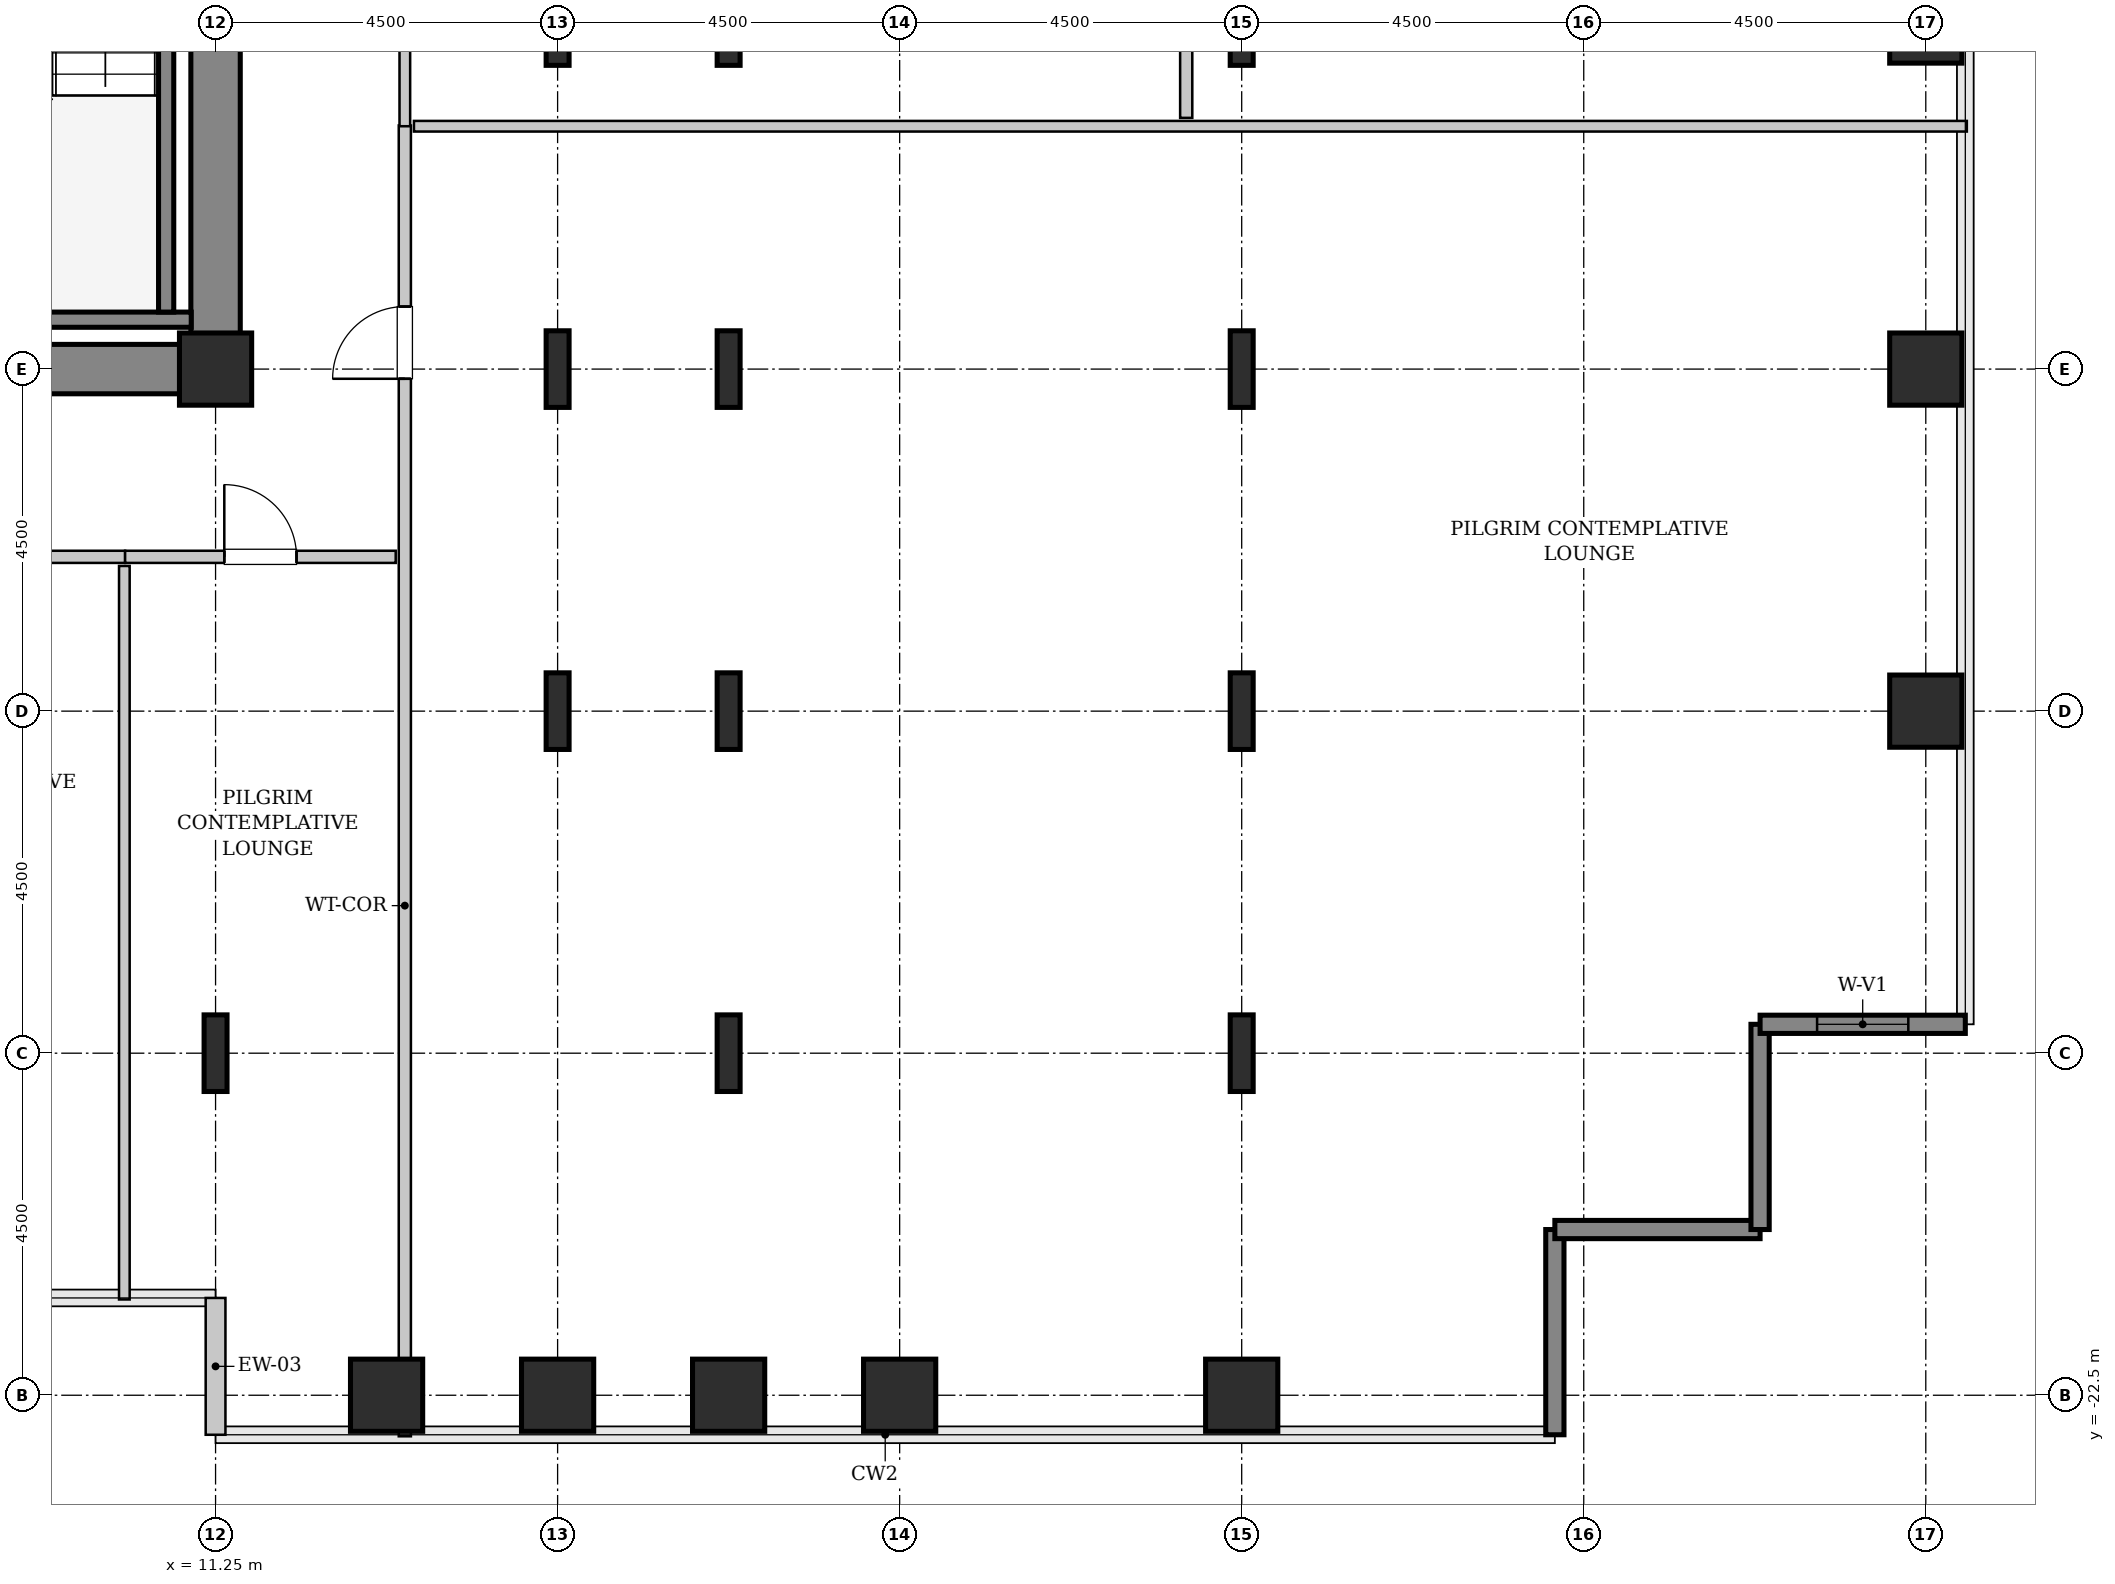
"""IFC4 building model, lengths in metres.
Left out: names, types, materials, properties, quantities, classifications, styles, units other than length and angle.
Written with IfcOpenShell. Run it as: python <this file> out.ifc"""

import sys

from ifc_helpers import new_model, si_unit, direction, frame, frame_2d, origin, origin_2d, place, context, subcontext, project, spatial, rectangle, hollow_rectangle, i_section, extrude, source, transform, mapped, element, fill, save


model = new_model("IFC4")
c1 = context("Model", 3, precision=1e-05, world=origin(), true_north=direction((0.0, 1.0)))
c2 = subcontext(c1, "Body", "Model", "MODEL_VIEW")
j1 = project(units=[si_unit("LENGTHUNIT", "METRE"), si_unit("PLANEANGLEUNIT", "RADIAN")], contexts=[c1])
p1 = place(None, origin())
s1 = spatial("IfcSite", under=j1, at=p1, CompositionType="ELEMENT")
p2 = place(p1, origin())
s2 = spatial("IfcBuilding", under=s1, at=p2, CompositionType="ELEMENT")
p3 = place(p2, frame((0.0, 0.0, 74.8)))
s3 = spatial("IfcBuildingStorey", under=s2, at=p3, CompositionType="ELEMENT", Elevation=74.8)
m1 = source(origin(), c2, "Body", "SweptSolid", [
    extrude(rectangle(XDim=10.025, YDim=0.65, at=frame_2d((5.012, 0.0))), origin(), (0.0, 0.0, 1.0), 3.8),
])
p4 = place(p3, frame((1.55, -9.0, 0.0), z_axis=(0.0, 0.0, 1.0), x_axis=(1.0, 0.0, 0.0)))
e1 = element("IfcWall", 1, at=p4, inside=s3, PredefinedType="SHEAR", context=c2, shape_type="MappedRepresentation", body=[
    mapped(m1, transform((0.0, 0.0, 0.0), x_axis=(1.0, 0.0, 0.0), y_axis=(0.0, 1.0, 0.0), z_axis=(0.0, 0.0, 1.0), scale=1.0)),
])
m2 = source(origin(), c2, "Body", "SweptSolid", [
    extrude(rectangle(XDim=7.325, YDim=0.65, at=frame_2d((3.663, 0.0))), origin(), (0.0, 0.0, 1.0), 3.8),
])
p5 = place(p3, frame((11.25, -8.675, 0.0), z_axis=(0.0, 0.0, 1.0), x_axis=(0.0, 1.0, 0.0)))
e2 = element("IfcWall", 2, at=p5, inside=s3, PredefinedType="SHEAR", context=c2, shape_type="MappedRepresentation", body=[
    mapped(m2, transform((0.0, 0.0, 0.0), x_axis=(1.0, 0.0, 0.0), y_axis=(0.0, 1.0, 0.0), z_axis=(0.0, 0.0, 1.0), scale=1.0)),
])
m3 = source(origin(), c2, "Body", "SweptSolid", [
    extrude(i_section(OverallWidth=0.302, OverallDepth=1.008, WebThickness=0.021, FlangeThickness=0.04, FilletRadius=0.03, at=origin_2d()), origin(), (0.0, 0.0, 1.0), 3.8),
])
p6 = place(p3, frame((11.25, -18.0, 0.0), z_axis=(0.0, 0.0, 1.0), x_axis=(1.0, 0.0, 0.0)))
e3 = element("IfcColumn", 3, at=p6, inside=s3, PredefinedType="COLUMN", context=c2, shape_type="MappedRepresentation", body=[
    mapped(m3, transform((0.0, 0.0, 0.0), x_axis=(1.0, 0.0, 0.0), y_axis=(0.0, 1.0, 0.0), z_axis=(0.0, 0.0, 1.0), scale=1.0)),
])
m4 = source(origin(), c2, "Body", "SweptSolid", [
    extrude(hollow_rectangle(XDim=0.95, YDim=0.95, WallThickness=0.045, InnerFilletRadius=0.045, OuterFilletRadius=0.09, at=origin_2d()), origin(), (0.0, 0.0, 1.0), 3.8),
])
p7 = place(p3, frame((11.25, -9.0, 0.0), z_axis=(0.0, 0.0, 1.0), x_axis=(1.0, 0.0, 0.0)))
e4 = element("IfcColumn", 4, at=p7, inside=s3, PredefinedType="COLUMN", context=c2, shape_type="MappedRepresentation", body=[
    mapped(m4, transform((0.0, 0.0, 0.0), x_axis=(1.0, 0.0, 0.0), y_axis=(0.0, 1.0, 0.0), z_axis=(0.0, 0.0, 1.0), scale=1.0)),
])
m5 = source(origin(), c2, "Body", "SweptSolid", [
    extrude(hollow_rectangle(XDim=0.95, YDim=0.95, WallThickness=0.045, InnerFilletRadius=0.045, OuterFilletRadius=0.09, at=origin_2d()), origin(), (0.0, 0.0, 1.0), 3.8),
])
for number, where, z_axis, x_axis in (
    (5, (13.5, -22.5, 0.0), (0.0, 0.0, 1.0), (1.0, 0.0, 0.0)),
    (6, (15.75, -22.5, 0.0), (0.0, 0.0, 1.0), (1.0, 0.0, 0.0)),
):
    element("IfcColumn", number, at=place(p3, frame(where, z_axis=z_axis, x_axis=x_axis)), inside=s3, PredefinedType="COLUMN", context=c2, shape_type="MappedRepresentation", body=[
        mapped(m5, transform((0.0, 0.0, 0.0), x_axis=(1.0, 0.0, 0.0), y_axis=(0.0, 1.0, 0.0), z_axis=(0.0, 0.0, 1.0), scale=1.0)),
    ])
for number, where, z_axis, x_axis in (
    (7, (15.75, -13.5, 0.0), (0.0, 0.0, 1.0), (1.0, 0.0, 0.0)),
    (8, (15.75, -9.0, 0.0), (0.0, 0.0, 1.0), (1.0, 0.0, 0.0)),
    (9, (15.75, -4.5, 0.0), (0.0, 0.0, 1.0), (1.0, 0.0, 0.0)),
):
    element("IfcColumn", number, at=place(p3, frame(where, z_axis=z_axis, x_axis=x_axis)), inside=s3, PredefinedType="COLUMN", context=c2, shape_type="MappedRepresentation", body=[
        mapped(m3, transform((0.0, 0.0, 0.0), x_axis=(1.0, 0.0, 0.0), y_axis=(0.0, 1.0, 0.0), z_axis=(0.0, 0.0, 1.0), scale=1.0)),
    ])
p8 = place(p3, frame((18.0, -22.5, 0.0), z_axis=(0.0, 0.0, 1.0), x_axis=(1.0, 0.0, 0.0)))
e10 = element("IfcColumn", 10, at=p8, inside=s3, PredefinedType="COLUMN", context=c2, shape_type="MappedRepresentation", body=[
    mapped(m5, transform((0.0, 0.0, 0.0), x_axis=(1.0, 0.0, 0.0), y_axis=(0.0, 1.0, 0.0), z_axis=(0.0, 0.0, 1.0), scale=1.0)),
])
for number, where, z_axis, x_axis in (
    (11, (18.0, -18.0, 0.0), (0.0, 0.0, 1.0), (1.0, 0.0, 0.0)),
    (12, (18.0, -13.5, 0.0), (0.0, 0.0, 1.0), (1.0, 0.0, 0.0)),
    (13, (18.0, -9.0, 0.0), (0.0, 0.0, 1.0), (1.0, 0.0, 0.0)),
    (14, (18.0, -4.5, 0.0), (0.0, 0.0, 1.0), (1.0, 0.0, 0.0)),
):
    element("IfcColumn", number, at=place(p3, frame(where, z_axis=z_axis, x_axis=x_axis)), inside=s3, PredefinedType="COLUMN", context=c2, shape_type="MappedRepresentation", body=[
        mapped(m3, transform((0.0, 0.0, 0.0), x_axis=(1.0, 0.0, 0.0), y_axis=(0.0, 1.0, 0.0), z_axis=(0.0, 0.0, 1.0), scale=1.0)),
    ])
for number, where, z_axis, x_axis in (
    (15, (20.25, -22.5, 0.0), (0.0, 0.0, 1.0), (1.0, 0.0, 0.0)),
    (16, (24.75, -22.5, 0.0), (0.0, 0.0, 1.0), (1.0, 0.0, 0.0)),
):
    element("IfcColumn", number, at=place(p3, frame(where, z_axis=z_axis, x_axis=x_axis)), inside=s3, PredefinedType="COLUMN", context=c2, shape_type="MappedRepresentation", body=[
        mapped(m5, transform((0.0, 0.0, 0.0), x_axis=(1.0, 0.0, 0.0), y_axis=(0.0, 1.0, 0.0), z_axis=(0.0, 0.0, 1.0), scale=1.0)),
    ])
for number, where, z_axis, x_axis in (
    (17, (24.75, -18.0, 0.0), (0.0, 0.0, 1.0), (1.0, 0.0, 0.0)),
    (18, (24.75, -13.5, 0.0), (0.0, 0.0, 1.0), (1.0, 0.0, 0.0)),
    (19, (24.75, -9.0, 0.0), (0.0, 0.0, 1.0), (1.0, 0.0, 0.0)),
    (20, (24.75, -4.5, 0.0), (0.0, 0.0, 1.0), (1.0, 0.0, 0.0)),
):
    element("IfcColumn", number, at=place(p3, frame(where, z_axis=z_axis, x_axis=x_axis)), inside=s3, PredefinedType="COLUMN", context=c2, shape_type="MappedRepresentation", body=[
        mapped(m3, transform((0.0, 0.0, 0.0), x_axis=(1.0, 0.0, 0.0), y_axis=(0.0, 1.0, 0.0), z_axis=(0.0, 0.0, 1.0), scale=1.0)),
    ])
for number, where, z_axis, x_axis in (
    (21, (33.75, -13.5, 0.0), (0.0, 0.0, 1.0), (1.0, 0.0, 0.0)),
    (22, (33.75, -9.0, 0.0), (0.0, 0.0, 1.0), (1.0, 0.0, 0.0)),
    (23, (33.75, -4.5, 0.0), (0.0, 0.0, 1.0), (1.0, 0.0, 0.0)),
):
    element("IfcColumn", number, at=place(p3, frame(where, z_axis=z_axis, x_axis=x_axis)), inside=s3, PredefinedType="COLUMN", context=c2, shape_type="MappedRepresentation", body=[
        mapped(m5, transform((0.0, 0.0, 0.0), x_axis=(1.0, 0.0, 0.0), y_axis=(0.0, 1.0, 0.0), z_axis=(0.0, 0.0, 1.0), scale=1.0)),
    ])
m6 = source(origin(), c2, "Body", "SweptSolid", [
    extrude(rectangle(XDim=1.8, YDim=0.26, at=frame_2d((0.9, 0.0))), origin(), (0.0, 0.0, 1.0), 3.55),
])
p9 = place(p3, frame((11.25, -21.22, 0.0), z_axis=(0.0, 0.0, 1.0), x_axis=(0.0, -1.0, 0.0)))
e24 = element("IfcWall", 24, at=p9, inside=s3, PredefinedType="SOLIDWALL", context=c2, shape_type="MappedRepresentation", body=[
    mapped(m6, transform((0.0, 0.0, 0.0), x_axis=(1.0, 0.0, 0.0), y_axis=(0.0, 1.0, 0.0), z_axis=(0.0, 0.0, 1.0), scale=1.0)),
])
m7 = source(origin(), c2, "Body", "SweptSolid", [
    extrude(rectangle(XDim=2.7, YDim=0.24, at=frame_2d((1.35, 0.0))), origin(), (0.0, 0.0, 1.0), 3.55),
])
for number, where, z_axis, x_axis in (
    (25, (28.87, -23.02, 0.0), (0.0, 0.0, 1.0), (0.0, 1.0, 0.0)),
    (26, (28.87, -20.32, 0.0), (0.0, 0.0, 1.0), (1.0, 0.0, 0.0)),
    (27, (31.57, -20.32, 0.0), (0.0, 0.0, 1.0), (0.0, 1.0, 0.0)),
):
    element("IfcWall", number, at=place(p3, frame(where, z_axis=z_axis, x_axis=x_axis)), inside=s3, PredefinedType="SHEAR", context=c2, shape_type="MappedRepresentation", body=[
        mapped(m7, transform((0.0, 0.0, 0.0), x_axis=(1.0, 0.0, 0.0), y_axis=(0.0, 1.0, 0.0), z_axis=(0.0, 0.0, 1.0), scale=1.0)),
    ])
p10 = place(p3, frame((31.57, -17.62, 0.0), z_axis=(0.0, 0.0, 1.0), x_axis=(1.0, 0.0, 0.0)))
e28 = element("IfcWall", 28, at=p10, inside=s3, PredefinedType="SHEAR", context=c2, shape_type="MappedRepresentation", body=[
    mapped(m7, transform((0.0, 0.0, 0.0), x_axis=(1.0, 0.0, 0.0), y_axis=(0.0, 1.0, 0.0), z_axis=(0.0, 0.0, 1.0), scale=1.0)),
])
p11 = place(p10, frame((0.75, 0.0, 0.85)))
e29 = element("IfcOpeningElement", 29, at=p11, cuts=e28, PredefinedType="OPENING", context=c2, shape_type="SweptSolid", body=[
    extrude(rectangle(XDim=1.2, YDim=1.8, at=frame_2d((0.6, 0.9))), frame((0.0, 0.13, 0.0), z_axis=(0.0, -1.0, 0.0), x_axis=(1.0, 0.0, 0.0)), (0.0, 0.0, 1.0), 0.26),
])
m8 = source(origin(), c2, "Body", "SweptSolid", [
    extrude(rectangle(XDim=3.63, YDim=0.2, at=frame_2d((1.815, 0.0))), origin(), (0.0, 0.0, 1.0), 3.8),
])
p12 = place(p3, frame((7.3, -8.35, 0.0), z_axis=(0.0, 0.0, 1.0), x_axis=(1.0, 0.0, 0.0)))
e30 = element("IfcWall", 30, at=p12, inside=s3, PredefinedType="SOLIDWALL", context=c2, shape_type="MappedRepresentation", body=[
    mapped(m8, transform((0.0, 0.0, 0.0), x_axis=(1.0, 0.0, 0.0), y_axis=(0.0, 1.0, 0.0), z_axis=(0.0, 0.0, 1.0), scale=1.0)),
])
m9 = source(origin(), c2, "Body", "SweptSolid", [
    extrude(rectangle(XDim=7.1, YDim=0.2, at=frame_2d((3.55, 0.0))), origin(), (0.0, 0.0, 1.0), 3.8),
])
p13 = place(p3, frame((10.6, -1.15, 0.0), z_axis=(0.0, 0.0, 1.0), x_axis=(0.0, -1.0, 0.0)))
e31 = element("IfcWall", 31, at=p13, inside=s3, PredefinedType="SOLIDWALL", context=c2, shape_type="MappedRepresentation", body=[
    mapped(m9, transform((0.0, 0.0, 0.0), x_axis=(1.0, 0.0, 0.0), y_axis=(0.0, 1.0, 0.0), z_axis=(0.0, 0.0, 1.0), scale=1.0)),
])
m10 = source(origin(), c2, "Body", "SweptSolid", [
    extrude(rectangle(XDim=17.245, YDim=0.16, at=frame_2d((8.623, 0.0))), origin(), (0.0, 0.0, 1.0), 3.535),
])
p14 = place(p3, frame((13.74, -23.04, 0.0), z_axis=(0.0, 0.0, 1.0), x_axis=(0.0, 1.0, 0.0)))
e32 = element("IfcWall", 32, at=p14, inside=s3, PredefinedType="PARTITIONING", context=c2, shape_type="MappedRepresentation", body=[
    mapped(m10, transform((0.0, 0.0, 0.0), x_axis=(1.0, 0.0, 0.0), y_axis=(0.0, 1.0, 0.0), z_axis=(0.0, 0.0, 1.0), scale=1.0)),
])
p15 = place(p14, frame((13.913, 0.0, 0.0)))
e33 = element("IfcOpeningElement", 33, at=p15, cuts=e32, PredefinedType="OPENING", context=c2, shape_type="SweptSolid", body=[
    extrude(rectangle(XDim=0.95, YDim=2.1, at=frame_2d((0.475, 1.05))), frame((0.0, 0.09, 0.0), z_axis=(0.0, -1.0, 0.0), x_axis=(1.0, 0.0, 0.0)), (0.0, 0.0, 1.0), 0.18),
])
m11 = source(origin(), c2, "Body", "SweptSolid", [
    extrude(rectangle(XDim=20.43, YDim=0.14, at=frame_2d((10.215, 0.0))), origin(), (0.0, 0.0, 1.0), 3.535),
])
p16 = place(p3, frame((13.86, -5.805, 0.0), z_axis=(0.0, 0.0, 1.0), x_axis=(1.0, 0.0, 0.0)))
e34 = element("IfcWall", 34, at=p16, inside=s3, PredefinedType="PARTITIONING", context=c2, shape_type="MappedRepresentation", body=[
    mapped(m11, transform((0.0, 0.0, 0.0), x_axis=(1.0, 0.0, 0.0), y_axis=(0.0, 1.0, 0.0), z_axis=(0.0, 0.0, 1.0), scale=1.0)),
])
m12 = source(origin(), c2, "Body", "SweptSolid", [
    extrude(rectangle(XDim=7.065, YDim=0.14, at=frame_2d((3.532, 0.0))), origin(), (0.0, 0.0, 1.0), 3.535),
])
p17 = place(p3, frame((13.74, -5.805, 0.0), z_axis=(0.0, 0.0, 1.0), x_axis=(0.0, 1.0, 0.0)))
e35 = element("IfcWall", 35, at=p17, inside=s3, PredefinedType="PARTITIONING", context=c2, shape_type="MappedRepresentation", body=[
    mapped(m12, transform((0.0, 0.0, 0.0), x_axis=(1.0, 0.0, 0.0), y_axis=(0.0, 1.0, 0.0), z_axis=(0.0, 0.0, 1.0), scale=1.0)),
])
m13 = source(origin(), c2, "Body", "SweptSolid", [
    extrude(rectangle(XDim=14.183, YDim=0.16, at=frame_2d((7.091, 0.0))), origin(), (0.0, 0.0, 1.0), 3.535),
])
p18 = place(p3, frame((24.02, -5.695, 0.0), z_axis=(0.0, 0.0, 1.0), x_axis=(0.0, 1.0, 0.0)))
e36 = element("IfcWall", 36, at=p18, inside=s3, PredefinedType="PARTITIONING", context=c2, shape_type="MappedRepresentation", body=[
    mapped(m13, transform((0.0, 0.0, 0.0), x_axis=(1.0, 0.0, 0.0), y_axis=(0.0, 1.0, 0.0), z_axis=(0.0, 0.0, 1.0), scale=1.0)),
])
p19 = place(p18, frame((7.47, 0.0, 0.0)))
e37 = element("IfcOpeningElement", 37, at=p19, cuts=e36, PredefinedType="OPENING", context=c2, shape_type="SweptSolid", body=[
    extrude(rectangle(XDim=0.95, YDim=2.1, at=frame_2d((0.475, 1.05))), frame((0.0, 0.09, 0.0), z_axis=(0.0, -1.0, 0.0), x_axis=(1.0, 0.0, 0.0)), (0.0, 0.0, 1.0), 0.18),
])
m14 = source(origin(), c2, "Body", "SweptSolid", [
    extrude(rectangle(XDim=3.665, YDim=0.16, at=frame_2d((1.833, 0.0))), origin(), (0.0, 0.0, 1.0), 3.535),
])
p20 = place(p3, frame((6.395, -11.47, 0.0), z_axis=(0.0, 0.0, 1.0), x_axis=(1.0, 0.0, 0.0)))
e38 = element("IfcWall", 38, at=p20, inside=s3, PredefinedType="PARTITIONING", context=c2, shape_type="MappedRepresentation", body=[
    mapped(m14, transform((0.0, 0.0, 0.0), x_axis=(1.0, 0.0, 0.0), y_axis=(0.0, 1.0, 0.0), z_axis=(0.0, 0.0, 1.0), scale=1.0)),
])
p21 = place(p20, frame((1.357, 0.0, 0.0)))
e39 = element("IfcOpeningElement", 39, at=p21, cuts=e38, PredefinedType="OPENING", context=c2, shape_type="SweptSolid", body=[
    extrude(rectangle(XDim=0.95, YDim=2.1, at=frame_2d((0.475, 1.05))), frame((0.0, 0.09, 0.0), z_axis=(0.0, -1.0, 0.0), x_axis=(1.0, 0.0, 0.0)), (0.0, 0.0, 1.0), 0.18),
])
m15 = source(origin(), c2, "Body", "SweptSolid", [
    extrude(rectangle(XDim=9.65, YDim=0.14, at=frame_2d((4.825, 0.0))), origin(), (0.0, 0.0, 1.0), 3.535),
])
p22 = place(p3, frame((10.05, -21.24, 0.0), z_axis=(0.0, 0.0, 1.0), x_axis=(0.0, 1.0, 0.0)))
e40 = element("IfcWall", 40, at=p22, inside=s3, PredefinedType="PARTITIONING", context=c2, shape_type="MappedRepresentation", body=[
    mapped(m15, transform((0.0, 0.0, 0.0), x_axis=(1.0, 0.0, 0.0), y_axis=(0.0, 1.0, 0.0), z_axis=(0.0, 0.0, 1.0), scale=1.0)),
])
m16 = source(origin(), c2, "Body", "SweptSolid", [
    extrude(rectangle(XDim=3.56, YDim=0.16, at=frame_2d((1.78, 0.0))), origin(), (0.0, 0.0, 1.0), 3.535),
])
p23 = place(p3, frame((10.06, -11.47, 0.0), z_axis=(0.0, 0.0, 1.0), x_axis=(1.0, 0.0, 0.0)))
e41 = element("IfcWall", 41, at=p23, inside=s3, PredefinedType="PARTITIONING", context=c2, shape_type="MappedRepresentation", body=[
    mapped(m16, transform((0.0, 0.0, 0.0), x_axis=(1.0, 0.0, 0.0), y_axis=(0.0, 1.0, 0.0), z_axis=(0.0, 0.0, 1.0), scale=1.0)),
])
p24 = place(p23, frame((1.305, 0.0, 0.0)))
e42 = element("IfcOpeningElement", 42, at=p24, cuts=e41, PredefinedType="OPENING", context=c2, shape_type="SweptSolid", body=[
    extrude(rectangle(XDim=0.95, YDim=2.1, at=frame_2d((0.475, 1.05))), frame((0.0, 0.09, 0.0), z_axis=(0.0, -1.0, 0.0), x_axis=(1.0, 0.0, 0.0)), (0.0, 0.0, 1.0), 0.18),
])
m17 = source(origin(), c2, "Body", "SweptSolid", [
    extrude(rectangle(XDim=1.2, YDim=1.8, at=frame_2d((0.6, 0.9))), frame((0.0, 0.03, 0.0), z_axis=(0.0, -1.0, 0.0), x_axis=(1.0, 0.0, 0.0)), (0.0, 0.0, 1.0), 0.06),
])
p25 = place(p11, origin())
e43 = element("IfcWindow", 43, at=p25, inside=s3, PartitioningType="SINGLE_PANEL", PredefinedType="WINDOW", context=c2, shape_type="MappedRepresentation", body=[
    mapped(m17, transform((0.0, 0.0, 0.0), x_axis=(1.0, 0.0, 0.0), y_axis=(0.0, 1.0, 0.0), z_axis=(0.0, 0.0, 1.0), scale=1.0)),
])
fill(e29, e43)
m18 = source(origin(), c2, "Body", "SweptSolid", [
    extrude(rectangle(XDim=0.95, YDim=2.1, at=frame_2d((0.475, 1.05))), frame((0.0, 0.025, 0.0), z_axis=(0.0, -1.0, 0.0), x_axis=(1.0, 0.0, 0.0)), (0.0, 0.0, 1.0), 0.05),
])
p26 = place(p15, origin())
e44 = element("IfcDoor", 44, at=p26, inside=s3, OperationType="SINGLE_SWING_LEFT", PredefinedType="DOOR", context=c2, shape_type="MappedRepresentation", body=[
    mapped(m18, transform((0.0, 0.0, 0.0), x_axis=(1.0, 0.0, 0.0), y_axis=(0.0, 1.0, 0.0), z_axis=(0.0, 0.0, 1.0), scale=1.0)),
])
fill(e33, e44)
p27 = place(p24, origin())
e45 = element("IfcDoor", 45, at=p27, inside=s3, OperationType="SINGLE_SWING_LEFT", PredefinedType="DOOR", context=c2, shape_type="MappedRepresentation", body=[
    mapped(m18, transform((0.0, 0.0, 0.0), x_axis=(1.0, 0.0, 0.0), y_axis=(0.0, 1.0, 0.0), z_axis=(0.0, 0.0, 1.0), scale=1.0)),
])
fill(e42, e45)
save(model, sys.argv[1])
